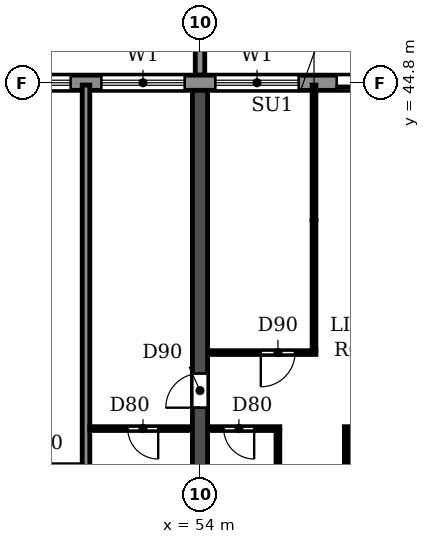
"""IFC4 building model, lengths in metres.
Left out: names, types, materials, properties, quantities, classifications, styles, units other than length and angle.
Written with IfcOpenShell. Run it as: python <this file> out.ifc"""

import sys

from ifc_helpers import new_model, si_unit, direction, frame, frame_2d, origin, place, context, subcontext, project, spatial, polyline, rectangle, outline, extrude, source, transform, mapped, element, fill, save


model = new_model("IFC4")
c1 = context("Model", 3, precision=1e-05, world=origin(), true_north=direction((0.0, 1.0)))
c2 = subcontext(c1, "Body", "Model", "MODEL_VIEW")
j1 = project(units=[si_unit("LENGTHUNIT", "METRE"), si_unit("PLANEANGLEUNIT", "RADIAN")], contexts=[c1])
p1 = place(None, origin())
s1 = spatial("IfcSite", under=j1, at=p1, CompositionType="ELEMENT")
p2 = place(p1, origin())
s2 = spatial("IfcBuilding", under=s1, at=p2, CompositionType="ELEMENT")
p3 = place(p2, frame((0.0, 0.0, 49.8)))
s3 = spatial("IfcBuildingStorey", under=s2, at=p3, CompositionType="ELEMENT", Elevation=49.8)
p4 = place(p3, frame((54.0, 30.55, 0.0), z_axis=(0.0, 0.0, 1.0), x_axis=(0.0, 1.0, 0.0)))
e1 = element("IfcWall", 1, at=p4, inside=s3, PredefinedType="SHEAR", context=c2, shape_type="SweptSolid", body=[
    extrude(rectangle(XDim=14.05, YDim=0.4, at=frame_2d((7.025, 0.0))), origin(), (0.0, 0.0, 1.0), 3.0),
])
p5 = place(p4, frame((5.7, 0.0, 0.0)))
e2 = element("IfcOpeningElement", 2, at=p5, cuts=e1, PredefinedType="OPENING", context=c2, shape_type="SweptSolid", body=[
    extrude(rectangle(XDim=0.9, YDim=2.1, at=frame_2d((0.45, 1.05))), frame((0.0, 0.21, 0.0), z_axis=(0.0, -1.0, 0.0), x_axis=(1.0, 0.0, 0.0)), (0.0, 0.0, 1.0), 0.42),
])
p6 = place(p3, frame((97.317, 44.8, 0.0), z_axis=(0.0, 0.0, 1.0), x_axis=(-1.0, 0.0, 0.0)))
e3 = element("IfcWall", 3, at=p6, inside=s3, PredefinedType="STANDARD", context=c2, shape_type="SweptSolid", body=[
    extrude(rectangle(XDim=92.634, YDim=0.4, at=frame_2d((46.317, 0.0))), origin(), (0.0, 0.0, 1.0), 3.0),
])
p7 = place(p6, frame((88.917, 0.0, 0.0)))
e4 = element("IfcOpeningElement", 4, at=p7, cuts=e3, PredefinedType="OPENING", context=c2, shape_type="SweptSolid", body=[
    extrude(rectangle(XDim=1.8, YDim=2.4, at=frame_2d((0.9, 1.2))), frame((0.0, 0.21, 0.0), z_axis=(0.0, -1.0, 0.0), x_axis=(1.0, 0.0, 0.0)), (0.0, 0.0, 1.0), 0.42),
])
p8 = place(p6, frame((85.717, 0.0, 0.9)))
e5 = element("IfcOpeningElement", 5, at=p8, cuts=e3, PredefinedType="OPENING", context=c2, shape_type="SweptSolid", body=[
    extrude(rectangle(XDim=2.2, YDim=1.5, at=frame_2d((1.1, 0.75))), frame((0.0, 0.21, 0.0), z_axis=(0.0, -1.0, 0.0), x_axis=(1.0, 0.0, 0.0)), (0.0, 0.0, 1.0), 0.42),
])
p9 = place(p6, frame((82.717, 0.0, 0.9)))
e6 = element("IfcOpeningElement", 6, at=p9, cuts=e3, PredefinedType="OPENING", context=c2, shape_type="SweptSolid", body=[
    extrude(rectangle(XDim=2.2, YDim=1.5, at=frame_2d((1.1, 0.75))), frame((0.0, 0.21, 0.0), z_axis=(0.0, -1.0, 0.0), x_axis=(1.0, 0.0, 0.0)), (0.0, 0.0, 1.0), 0.42),
])
p10 = place(p6, frame((79.717, 0.0, 0.9)))
e7 = element("IfcOpeningElement", 7, at=p10, cuts=e3, PredefinedType="OPENING", context=c2, shape_type="SweptSolid", body=[
    extrude(rectangle(XDim=2.2, YDim=1.5, at=frame_2d((1.1, 0.75))), frame((0.0, 0.21, 0.0), z_axis=(0.0, -1.0, 0.0), x_axis=(1.0, 0.0, 0.0)), (0.0, 0.0, 1.0), 0.42),
])
p11 = place(p6, frame((76.717, 0.0, 0.9)))
e8 = element("IfcOpeningElement", 8, at=p11, cuts=e3, PredefinedType="OPENING", context=c2, shape_type="SweptSolid", body=[
    extrude(rectangle(XDim=2.2, YDim=1.5, at=frame_2d((1.1, 0.75))), frame((0.0, 0.21, 0.0), z_axis=(0.0, -1.0, 0.0), x_axis=(1.0, 0.0, 0.0)), (0.0, 0.0, 1.0), 0.42),
])
p12 = place(p6, frame((73.917, 0.0, 0.0)))
e9 = element("IfcOpeningElement", 9, at=p12, cuts=e3, PredefinedType="OPENING", context=c2, shape_type="SweptSolid", body=[
    extrude(rectangle(XDim=1.8, YDim=2.4, at=frame_2d((0.9, 1.2))), frame((0.0, 0.21, 0.0), z_axis=(0.0, -1.0, 0.0), x_axis=(1.0, 0.0, 0.0)), (0.0, 0.0, 1.0), 0.42),
])
p13 = place(p6, frame((70.717, 0.0, 0.9)))
e10 = element("IfcOpeningElement", 10, at=p13, cuts=e3, PredefinedType="OPENING", context=c2, shape_type="SweptSolid", body=[
    extrude(rectangle(XDim=2.2, YDim=1.5, at=frame_2d((1.1, 0.75))), frame((0.0, 0.21, 0.0), z_axis=(0.0, -1.0, 0.0), x_axis=(1.0, 0.0, 0.0)), (0.0, 0.0, 1.0), 0.42),
])
p14 = place(p6, frame((67.717, 0.0, 0.9)))
e11 = element("IfcOpeningElement", 11, at=p14, cuts=e3, PredefinedType="OPENING", context=c2, shape_type="SweptSolid", body=[
    extrude(rectangle(XDim=2.2, YDim=1.5, at=frame_2d((1.1, 0.75))), frame((0.0, 0.21, 0.0), z_axis=(0.0, -1.0, 0.0), x_axis=(1.0, 0.0, 0.0)), (0.0, 0.0, 1.0), 0.42),
])
p15 = place(p6, frame((64.717, 0.0, 0.9)))
e12 = element("IfcOpeningElement", 12, at=p15, cuts=e3, PredefinedType="OPENING", context=c2, shape_type="SweptSolid", body=[
    extrude(rectangle(XDim=2.2, YDim=1.5, at=frame_2d((1.1, 0.75))), frame((0.0, 0.21, 0.0), z_axis=(0.0, -1.0, 0.0), x_axis=(1.0, 0.0, 0.0)), (0.0, 0.0, 1.0), 0.42),
])
p16 = place(p6, frame((61.917, 0.0, 0.0)))
e13 = element("IfcOpeningElement", 13, at=p16, cuts=e3, PredefinedType="OPENING", context=c2, shape_type="SweptSolid", body=[
    extrude(rectangle(XDim=1.8, YDim=2.4, at=frame_2d((0.9, 1.2))), frame((0.0, 0.21, 0.0), z_axis=(0.0, -1.0, 0.0), x_axis=(1.0, 0.0, 0.0)), (0.0, 0.0, 1.0), 0.42),
])
p17 = place(p6, frame((58.717, 0.0, 0.9)))
e14 = element("IfcOpeningElement", 14, at=p17, cuts=e3, PredefinedType="OPENING", context=c2, shape_type="SweptSolid", body=[
    extrude(rectangle(XDim=2.2, YDim=1.5, at=frame_2d((1.1, 0.75))), frame((0.0, 0.21, 0.0), z_axis=(0.0, -1.0, 0.0), x_axis=(1.0, 0.0, 0.0)), (0.0, 0.0, 1.0), 0.42),
])
p18 = place(p6, frame((55.717, 0.0, 0.9)))
e15 = element("IfcOpeningElement", 15, at=p18, cuts=e3, PredefinedType="OPENING", context=c2, shape_type="SweptSolid", body=[
    extrude(rectangle(XDim=2.2, YDim=1.5, at=frame_2d((1.1, 0.75))), frame((0.0, 0.21, 0.0), z_axis=(0.0, -1.0, 0.0), x_axis=(1.0, 0.0, 0.0)), (0.0, 0.0, 1.0), 0.42),
])
p19 = place(p6, frame((52.717, 0.0, 0.9)))
e16 = element("IfcOpeningElement", 16, at=p19, cuts=e3, PredefinedType="OPENING", context=c2, shape_type="SweptSolid", body=[
    extrude(rectangle(XDim=2.2, YDim=1.5, at=frame_2d((1.1, 0.75))), frame((0.0, 0.21, 0.0), z_axis=(0.0, -1.0, 0.0), x_axis=(1.0, 0.0, 0.0)), (0.0, 0.0, 1.0), 0.42),
])
p20 = place(p6, frame((49.917, 0.0, 0.0)))
e17 = element("IfcOpeningElement", 17, at=p20, cuts=e3, PredefinedType="OPENING", context=c2, shape_type="SweptSolid", body=[
    extrude(rectangle(XDim=1.8, YDim=2.4, at=frame_2d((0.9, 1.2))), frame((0.0, 0.21, 0.0), z_axis=(0.0, -1.0, 0.0), x_axis=(1.0, 0.0, 0.0)), (0.0, 0.0, 1.0), 0.42),
])
p21 = place(p6, frame((46.717, 0.0, 0.9)))
e18 = element("IfcOpeningElement", 18, at=p21, cuts=e3, PredefinedType="OPENING", context=c2, shape_type="SweptSolid", body=[
    extrude(rectangle(XDim=2.2, YDim=1.5, at=frame_2d((1.1, 0.75))), frame((0.0, 0.21, 0.0), z_axis=(0.0, -1.0, 0.0), x_axis=(1.0, 0.0, 0.0)), (0.0, 0.0, 1.0), 0.42),
])
p22 = place(p6, frame((43.717, 0.0, 0.9)))
e19 = element("IfcOpeningElement", 19, at=p22, cuts=e3, PredefinedType="OPENING", context=c2, shape_type="SweptSolid", body=[
    extrude(rectangle(XDim=2.2, YDim=1.5, at=frame_2d((1.1, 0.75))), frame((0.0, 0.21, 0.0), z_axis=(0.0, -1.0, 0.0), x_axis=(1.0, 0.0, 0.0)), (0.0, 0.0, 1.0), 0.42),
])
p23 = place(p6, frame((40.717, 0.0, 0.9)))
e20 = element("IfcOpeningElement", 20, at=p23, cuts=e3, PredefinedType="OPENING", context=c2, shape_type="SweptSolid", body=[
    extrude(rectangle(XDim=2.2, YDim=1.5, at=frame_2d((1.1, 0.75))), frame((0.0, 0.21, 0.0), z_axis=(0.0, -1.0, 0.0), x_axis=(1.0, 0.0, 0.0)), (0.0, 0.0, 1.0), 0.42),
])
p24 = place(p6, frame((37.917, 0.0, 0.0)))
e21 = element("IfcOpeningElement", 21, at=p24, cuts=e3, PredefinedType="OPENING", context=c2, shape_type="SweptSolid", body=[
    extrude(rectangle(XDim=1.8, YDim=2.4, at=frame_2d((0.9, 1.2))), frame((0.0, 0.21, 0.0), z_axis=(0.0, -1.0, 0.0), x_axis=(1.0, 0.0, 0.0)), (0.0, 0.0, 1.0), 0.42),
])
p25 = place(p6, frame((34.717, 0.0, 0.9)))
e22 = element("IfcOpeningElement", 22, at=p25, cuts=e3, PredefinedType="OPENING", context=c2, shape_type="SweptSolid", body=[
    extrude(rectangle(XDim=2.2, YDim=1.5, at=frame_2d((1.1, 0.75))), frame((0.0, 0.21, 0.0), z_axis=(0.0, -1.0, 0.0), x_axis=(1.0, 0.0, 0.0)), (0.0, 0.0, 1.0), 0.42),
])
p26 = place(p6, frame((31.717, 0.0, 0.9)))
e23 = element("IfcOpeningElement", 23, at=p26, cuts=e3, PredefinedType="OPENING", context=c2, shape_type="SweptSolid", body=[
    extrude(rectangle(XDim=2.2, YDim=1.5, at=frame_2d((1.1, 0.75))), frame((0.0, 0.21, 0.0), z_axis=(0.0, -1.0, 0.0), x_axis=(1.0, 0.0, 0.0)), (0.0, 0.0, 1.0), 0.42),
])
p27 = place(p6, frame((28.717, 0.0, 0.9)))
e24 = element("IfcOpeningElement", 24, at=p27, cuts=e3, PredefinedType="OPENING", context=c2, shape_type="SweptSolid", body=[
    extrude(rectangle(XDim=2.2, YDim=1.5, at=frame_2d((1.1, 0.75))), frame((0.0, 0.21, 0.0), z_axis=(0.0, -1.0, 0.0), x_axis=(1.0, 0.0, 0.0)), (0.0, 0.0, 1.0), 0.42),
])
p28 = place(p6, frame((25.917, 0.0, 0.0)))
e25 = element("IfcOpeningElement", 25, at=p28, cuts=e3, PredefinedType="OPENING", context=c2, shape_type="SweptSolid", body=[
    extrude(rectangle(XDim=1.8, YDim=2.4, at=frame_2d((0.9, 1.2))), frame((0.0, 0.21, 0.0), z_axis=(0.0, -1.0, 0.0), x_axis=(1.0, 0.0, 0.0)), (0.0, 0.0, 1.0), 0.42),
])
p29 = place(p6, frame((22.917, 0.0, 0.0)))
e26 = element("IfcOpeningElement", 26, at=p29, cuts=e3, PredefinedType="OPENING", context=c2, shape_type="SweptSolid", body=[
    extrude(rectangle(XDim=1.8, YDim=2.4, at=frame_2d((0.9, 1.2))), frame((0.0, 0.21, 0.0), z_axis=(0.0, -1.0, 0.0), x_axis=(1.0, 0.0, 0.0)), (0.0, 0.0, 1.0), 0.42),
])
p30 = place(p6, frame((19.717, 0.0, 0.9)))
e27 = element("IfcOpeningElement", 27, at=p30, cuts=e3, PredefinedType="OPENING", context=c2, shape_type="SweptSolid", body=[
    extrude(rectangle(XDim=2.2, YDim=1.5, at=frame_2d((1.1, 0.75))), frame((0.0, 0.21, 0.0), z_axis=(0.0, -1.0, 0.0), x_axis=(1.0, 0.0, 0.0)), (0.0, 0.0, 1.0), 0.42),
])
p31 = place(p6, frame((16.717, 0.0, 0.9)))
e28 = element("IfcOpeningElement", 28, at=p31, cuts=e3, PredefinedType="OPENING", context=c2, shape_type="SweptSolid", body=[
    extrude(rectangle(XDim=2.2, YDim=1.5, at=frame_2d((1.1, 0.75))), frame((0.0, 0.21, 0.0), z_axis=(0.0, -1.0, 0.0), x_axis=(1.0, 0.0, 0.0)), (0.0, 0.0, 1.0), 0.42),
])
p32 = place(p6, frame((13.717, 0.0, 0.9)))
e29 = element("IfcOpeningElement", 29, at=p32, cuts=e3, PredefinedType="OPENING", context=c2, shape_type="SweptSolid", body=[
    extrude(rectangle(XDim=2.2, YDim=1.5, at=frame_2d((1.1, 0.75))), frame((0.0, 0.21, 0.0), z_axis=(0.0, -1.0, 0.0), x_axis=(1.0, 0.0, 0.0)), (0.0, 0.0, 1.0), 0.42),
])
p33 = place(p6, frame((10.717, 0.0, 0.9)))
e30 = element("IfcOpeningElement", 30, at=p33, cuts=e3, PredefinedType="OPENING", context=c2, shape_type="SweptSolid", body=[
    extrude(rectangle(XDim=2.2, YDim=1.5, at=frame_2d((1.1, 0.75))), frame((0.0, 0.21, 0.0), z_axis=(0.0, -1.0, 0.0), x_axis=(1.0, 0.0, 0.0)), (0.0, 0.0, 1.0), 0.42),
])
p34 = place(p6, frame((7.917, 0.0, 0.0)))
e31 = element("IfcOpeningElement", 31, at=p34, cuts=e3, PredefinedType="OPENING", context=c2, shape_type="SweptSolid", body=[
    extrude(rectangle(XDim=1.8, YDim=2.4, at=frame_2d((0.9, 1.2))), frame((0.0, 0.21, 0.0), z_axis=(0.0, -1.0, 0.0), x_axis=(1.0, 0.0, 0.0)), (0.0, 0.0, 1.0), 0.42),
])
p35 = place(p6, frame((4.717, 0.0, 0.9)))
e32 = element("IfcOpeningElement", 32, at=p35, cuts=e3, PredefinedType="OPENING", context=c2, shape_type="SweptSolid", body=[
    extrude(rectangle(XDim=2.2, YDim=1.5, at=frame_2d((1.1, 0.75))), frame((0.0, 0.21, 0.0), z_axis=(0.0, -1.0, 0.0), x_axis=(1.0, 0.0, 0.0)), (0.0, 0.0, 1.0), 0.42),
])
p36 = place(p6, frame((1.917, 0.0, 0.0)))
e33 = element("IfcOpeningElement", 33, at=p36, cuts=e3, PredefinedType="OPENING", context=c2, shape_type="SweptSolid", body=[
    extrude(rectangle(XDim=1.8, YDim=2.4, at=frame_2d((0.9, 1.2))), frame((0.0, 0.21, 0.0), z_axis=(0.0, -1.0, 0.0), x_axis=(1.0, 0.0, 0.0)), (0.0, 0.0, 1.0), 0.42),
])
m1 = source(origin(), c2, "Body", "SweptSolid", [
    extrude(outline(polyline([(0.0, 0.0), (0.25, 0.0), (0.25, 3.1), (0.0, 3.1), (0.0, 0.0)])), origin(), (0.0, 0.0, 1.0), 3.1),
])
p37 = place(p3, frame((53.875, 45.0, 0.0)))
e34 = element("IfcWall", 34, at=p37, inside=s3, PredefinedType="STANDARD", context=c2, shape_type="MappedRepresentation", body=[
    mapped(m1, transform((0.0, 0.0, 0.0))),
])
p38 = place(p3, frame((51.0, 30.56, 0.0), z_axis=(0.0, 0.0, 1.0), x_axis=(0.0, 1.0, 0.0)))
e35 = element("IfcWall", 35, at=p38, inside=s3, PredefinedType="PARTITIONING", context=c2, shape_type="SweptSolid", body=[
    extrude(rectangle(XDim=14.18, YDim=0.2, at=frame_2d((7.09, 0.0))), origin(), (0.0, 0.0, 1.0), 3.0),
])
p39 = place(p3, frame((51.1, 35.7, 0.0), z_axis=(0.0, 0.0, 1.0), x_axis=(1.0, 0.0, 0.0)))
e36 = element("IfcWall", 36, at=p39, inside=s3, PredefinedType="PARTITIONING", context=c2, shape_type="SweptSolid", body=[
    extrude(rectangle(XDim=2.69, YDim=0.1, at=frame_2d((1.345, 0.0))), origin(), (0.0, 0.0, 1.0), 3.0),
])
p40 = place(p39, frame((1.0, 0.0, 0.0)))
e37 = element("IfcOpeningElement", 37, at=p40, cuts=e36, PredefinedType="OPENING", context=c2, shape_type="SweptSolid", body=[
    extrude(rectangle(XDim=0.8, YDim=2.1, at=frame_2d((0.4, 1.05))), frame((0.0, 0.06, 0.0), z_axis=(0.0, -1.0, 0.0), x_axis=(1.0, 0.0, 0.0)), (0.0, 0.0, 1.0), 0.12),
])
p41 = place(p3, frame((54.21, 35.7, 0.0), z_axis=(0.0, 0.0, 1.0), x_axis=(1.0, 0.0, 0.0)))
e38 = element("IfcWall", 38, at=p41, inside=s3, PredefinedType="PARTITIONING", context=c2, shape_type="SweptSolid", body=[
    extrude(rectangle(XDim=1.89, YDim=0.1, at=frame_2d((0.945, 0.0))), origin(), (0.0, 0.0, 1.0), 3.0),
])
p42 = place(p41, frame((0.415, 0.0, 0.0)))
e39 = element("IfcOpeningElement", 39, at=p42, cuts=e38, PredefinedType="OPENING", context=c2, shape_type="SweptSolid", body=[
    extrude(rectangle(XDim=0.8, YDim=2.1, at=frame_2d((0.4, 1.05))), frame((0.0, 0.06, 0.0), z_axis=(0.0, -1.0, 0.0), x_axis=(1.0, 0.0, 0.0)), (0.0, 0.0, 1.0), 0.12),
])
p43 = place(p3, frame((57.8, 35.7, 0.0), z_axis=(0.0, 0.0, 1.0), x_axis=(1.0, 0.0, 0.0)))
e40 = element("IfcWall", 40, at=p43, inside=s3, PredefinedType="PARTITIONING", context=c2, shape_type="SweptSolid", body=[
    extrude(rectangle(XDim=1.99, YDim=0.1, at=frame_2d((0.995, 0.0))), origin(), (0.0, 0.0, 1.0), 3.0),
])
p44 = place(p43, frame((0.675, 0.0, 0.0)))
e41 = element("IfcOpeningElement", 41, at=p44, cuts=e40, PredefinedType="OPENING", context=c2, shape_type="SweptSolid", body=[
    extrude(rectangle(XDim=0.9, YDim=2.1, at=frame_2d((0.45, 1.05))), frame((0.0, 0.06, 0.0), z_axis=(0.0, -1.0, 0.0), x_axis=(1.0, 0.0, 0.0)), (0.0, 0.0, 1.0), 0.12),
])
p45 = place(p3, frame((54.21, 37.7, 0.0), z_axis=(0.0, 0.0, 1.0), x_axis=(1.0, 0.0, 0.0)))
e42 = element("IfcWall", 42, at=p45, inside=s3, PredefinedType="PARTITIONING", context=c2, shape_type="SweptSolid", body=[
    extrude(rectangle(XDim=2.84, YDim=0.1, at=frame_2d((1.42, 0.0))), origin(), (0.0, 0.0, 1.0), 3.0),
])
p46 = place(p45, frame((1.39, 0.0, 0.0)))
e43 = element("IfcOpeningElement", 43, at=p46, cuts=e42, PredefinedType="OPENING", context=c2, shape_type="SweptSolid", body=[
    extrude(rectangle(XDim=0.9, YDim=2.1, at=frame_2d((0.45, 1.05))), frame((0.0, 0.06, 0.0), z_axis=(0.0, -1.0, 0.0), x_axis=(1.0, 0.0, 0.0)), (0.0, 0.0, 1.0), 0.12),
])
p47 = place(p3, frame((56.05, 30.56, 0.0), z_axis=(0.0, 0.0, 1.0), x_axis=(0.0, 1.0, 0.0)))
e44 = element("IfcWall", 44, at=p47, inside=s3, PredefinedType="PARTITIONING", context=c2, shape_type="SweptSolid", body=[
    extrude(rectangle(XDim=5.09, YDim=0.1, at=frame_2d((2.545, 0.0))), origin(), (0.0, 0.0, 1.0), 3.0),
])
p48 = place(p3, frame((57.0, 37.75, 0.0), z_axis=(0.0, 0.0, 1.0), x_axis=(0.0, 1.0, 0.0)))
e45 = element("IfcWall", 45, at=p48, inside=s3, PredefinedType="PARTITIONING", context=c2, shape_type="SweptSolid", body=[
    extrude(rectangle(XDim=6.99, YDim=0.1, at=frame_2d((3.495, 0.0))), origin(), (0.0, 0.0, 1.0), 3.0),
])
p49 = place(p3, frame((57.85, 30.56, 0.0), z_axis=(0.0, 0.0, 1.0), x_axis=(0.0, 1.0, 0.0)))
e46 = element("IfcWall", 46, at=p49, inside=s3, PredefinedType="PARTITIONING", context=c2, shape_type="SweptSolid", body=[
    extrude(rectangle(XDim=5.09, YDim=0.1, at=frame_2d((2.545, 0.0))), origin(), (0.0, 0.0, 1.0), 3.0),
])
p50 = place(p21, origin())
e47 = element("IfcWindow", 47, at=p50, inside=s3, PartitioningType="DOUBLE_PANEL_HORIZONTAL", PredefinedType="WINDOW", context=c2, shape_type="SweptSolid", body=[
    extrude(rectangle(XDim=2.2, YDim=1.5, at=frame_2d((1.1, 0.75))), frame((0.0, 0.03, 0.0), z_axis=(0.0, -1.0, 0.0), x_axis=(1.0, 0.0, 0.0)), (0.0, 0.0, 1.0), 0.06),
])
fill(e18, e47)
p51 = place(p22, origin())
e48 = element("IfcWindow", 48, at=p51, inside=s3, PartitioningType="DOUBLE_PANEL_HORIZONTAL", PredefinedType="WINDOW", context=c2, shape_type="SweptSolid", body=[
    extrude(rectangle(XDim=2.2, YDim=1.5, at=frame_2d((1.1, 0.75))), frame((0.0, 0.03, 0.0), z_axis=(0.0, -1.0, 0.0), x_axis=(1.0, 0.0, 0.0)), (0.0, 0.0, 1.0), 0.06),
])
fill(e19, e48)
p52 = place(p23, origin())
e49 = element("IfcWindow", 49, at=p52, inside=s3, PartitioningType="DOUBLE_PANEL_HORIZONTAL", PredefinedType="WINDOW", context=c2, shape_type="SweptSolid", body=[
    extrude(rectangle(XDim=2.2, YDim=1.5, at=frame_2d((1.1, 0.75))), frame((0.0, 0.03, 0.0), z_axis=(0.0, -1.0, 0.0), x_axis=(1.0, 0.0, 0.0)), (0.0, 0.0, 1.0), 0.06),
])
fill(e20, e49)
p53 = place(p24, origin())
e50 = element("IfcDoor", 50, at=p53, inside=s3, OperationType="DOUBLE_DOOR_SLIDING", PredefinedType="DOOR", context=c2, shape_type="SweptSolid", body=[
    extrude(rectangle(XDim=1.8, YDim=2.4, at=frame_2d((0.9, 1.2))), frame((0.0, 0.025, 0.0), z_axis=(0.0, -1.0, 0.0), x_axis=(1.0, 0.0, 0.0)), (0.0, 0.0, 1.0), 0.05),
])
fill(e21, e50)
p54 = place(p40, frame((0.8, 0.0, 0.0), z_axis=(0.0, 0.0, 1.0), x_axis=(-1.0, 0.0, 0.0)))
e51 = element("IfcDoor", 51, at=p54, inside=s3, OperationType="SINGLE_SWING_LEFT", PredefinedType="DOOR", context=c2, shape_type="SweptSolid", body=[
    extrude(rectangle(XDim=0.8, YDim=2.1, at=frame_2d((0.4, 1.05))), frame((0.0, 0.025, 0.0), z_axis=(0.0, -1.0, 0.0), x_axis=(1.0, 0.0, 0.0)), (0.0, 0.0, 1.0), 0.05),
])
fill(e37, e51)
p55 = place(p5, origin())
e52 = element("IfcDoor", 52, at=p55, inside=s3, OperationType="SINGLE_SWING_LEFT", PredefinedType="DOOR", context=c2, shape_type="SweptSolid", body=[
    extrude(rectangle(XDim=0.9, YDim=2.1, at=frame_2d((0.45, 1.05))), frame((0.0, 0.025, 0.0), z_axis=(0.0, -1.0, 0.0), x_axis=(1.0, 0.0, 0.0)), (0.0, 0.0, 1.0), 0.05),
])
fill(e2, e52)
p56 = place(p42, frame((0.8, 0.0, 0.0), z_axis=(0.0, 0.0, 1.0), x_axis=(-1.0, 0.0, 0.0)))
e53 = element("IfcDoor", 53, at=p56, inside=s3, OperationType="SINGLE_SWING_LEFT", PredefinedType="DOOR", context=c2, shape_type="SweptSolid", body=[
    extrude(rectangle(XDim=0.8, YDim=2.1, at=frame_2d((0.4, 1.05))), frame((0.0, 0.025, 0.0), z_axis=(0.0, -1.0, 0.0), x_axis=(1.0, 0.0, 0.0)), (0.0, 0.0, 1.0), 0.05),
])
fill(e39, e53)
p57 = place(p46, frame((0.9, 0.0, 0.0), z_axis=(0.0, 0.0, 1.0), x_axis=(-1.0, 0.0, 0.0)))
e54 = element("IfcDoor", 54, at=p57, inside=s3, OperationType="SINGLE_SWING_RIGHT", PredefinedType="DOOR", context=c2, shape_type="SweptSolid", body=[
    extrude(rectangle(XDim=0.9, YDim=2.1, at=frame_2d((0.45, 1.05))), frame((0.0, 0.025, 0.0), z_axis=(0.0, -1.0, 0.0), x_axis=(1.0, 0.0, 0.0)), (0.0, 0.0, 1.0), 0.05),
])
fill(e43, e54)
save(model, sys.argv[1])
